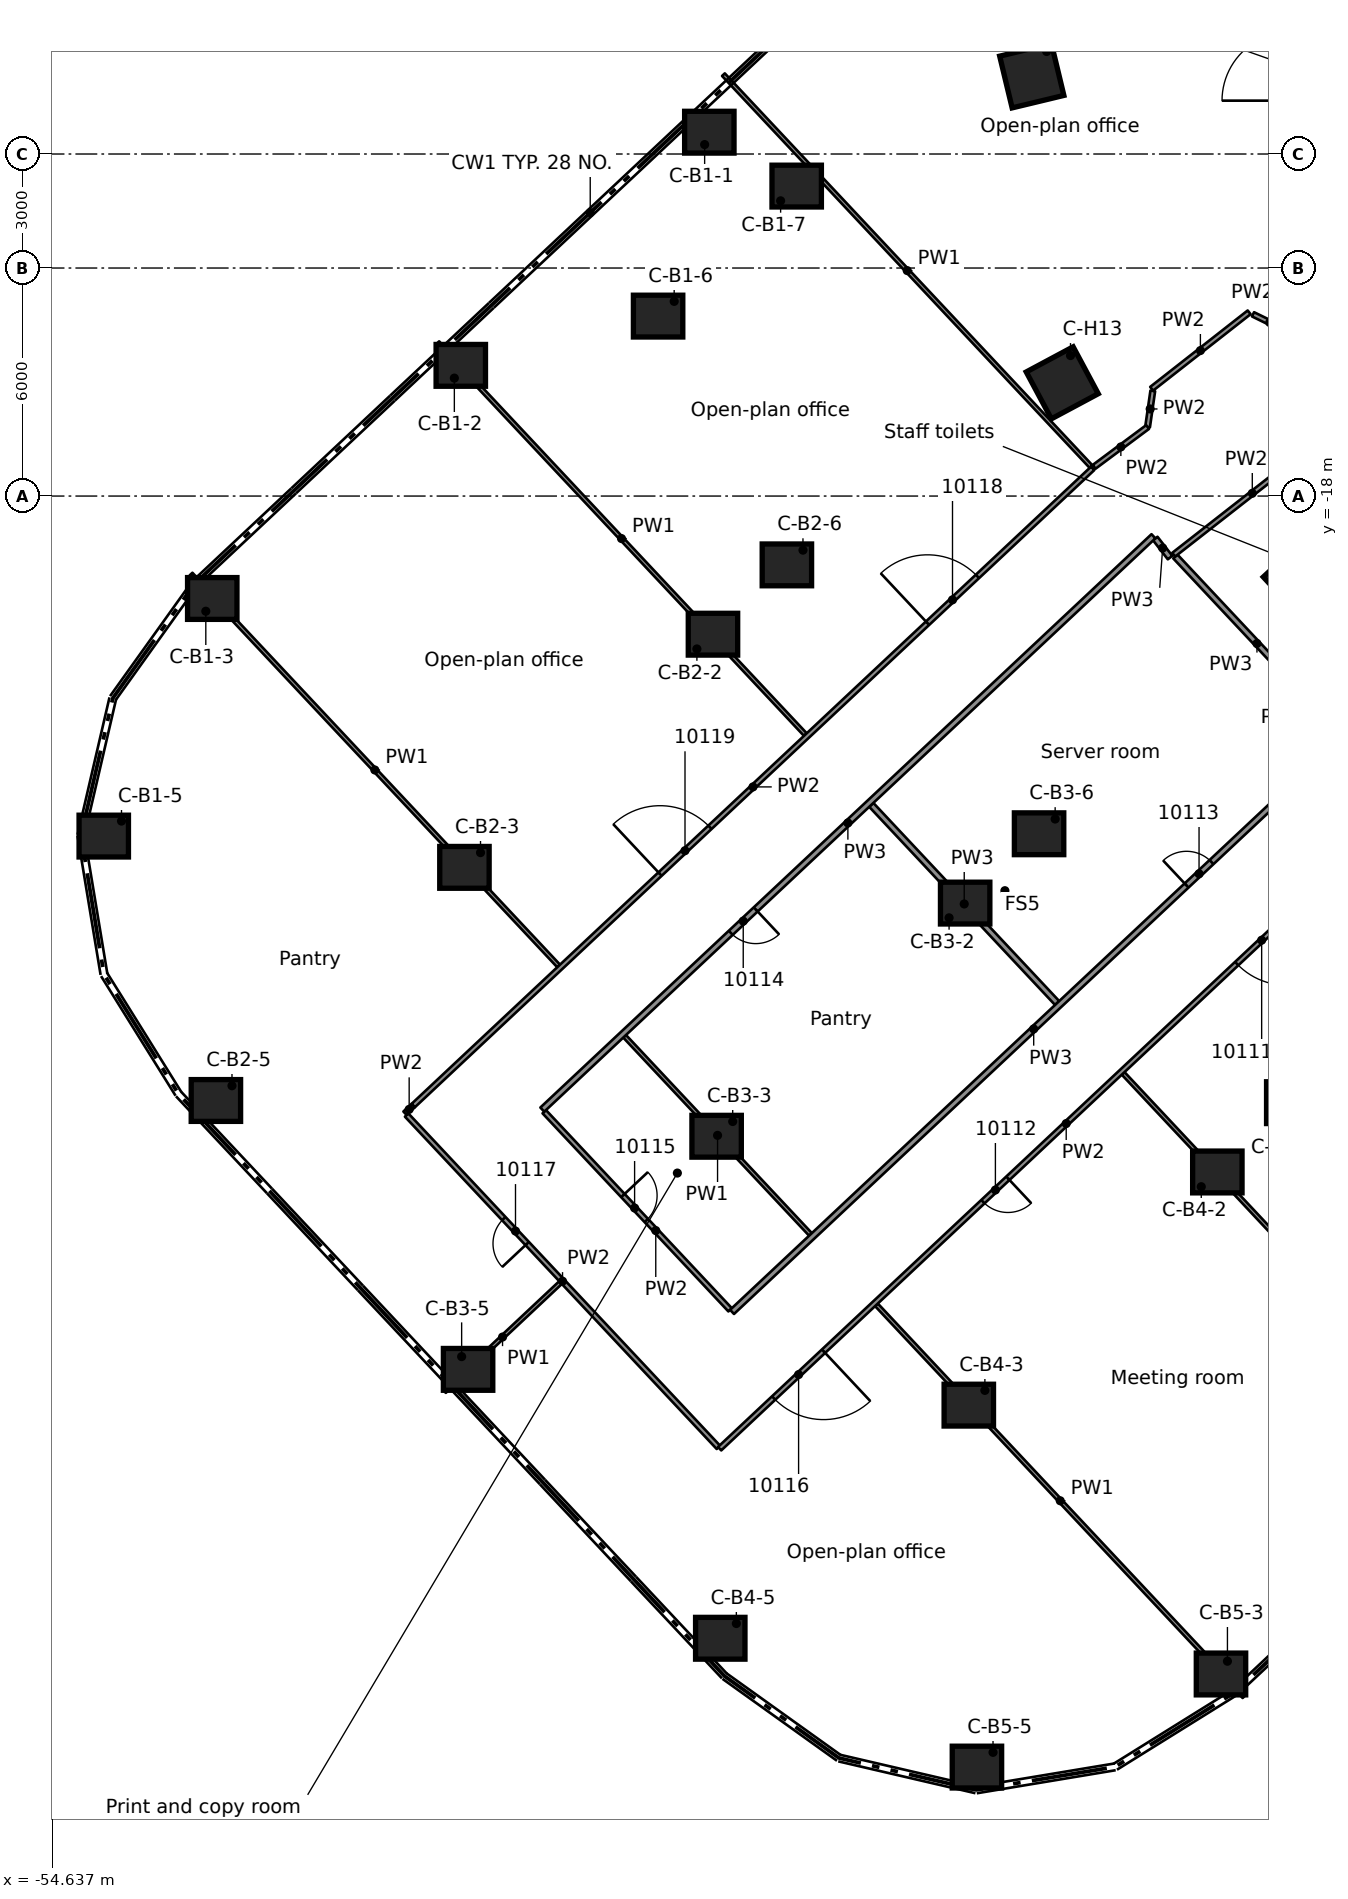
"""IFC4 building model, lengths in metres.
Left out: names, types, materials, properties, quantities, classifications, styles, units other than length and angle.
Written with IfcOpenShell. Run it as: python <this file> out.ifc"""

import sys

from ifc_helpers import new_model, si_unit, direction, frame, frame_2d, origin, origin_2d, place, context, subcontext, project, spatial, rectangle, extrude, element, fill, save


model = new_model("IFC4")
c1 = context("Model", 3, precision=1e-05, world=origin(), true_north=direction((0.0, 1.0)))
c2 = subcontext(c1, "Body", "Model", "MODEL_VIEW")
j1 = project(units=[si_unit("LENGTHUNIT", "METRE"), si_unit("PLANEANGLEUNIT", "RADIAN")], contexts=[c1])
p1 = place(None, origin())
s1 = spatial("IfcSite", under=j1, at=p1, CompositionType="ELEMENT")
p2 = place(p1, origin())
s2 = spatial("IfcBuilding", under=s1, at=p2, CompositionType="ELEMENT")
p3 = place(p2, frame((0.0, 0.0, 51.3)))
s3 = spatial("IfcBuildingStorey", under=s2, at=p3, CompositionType="ELEMENT", Elevation=51.3)
for number, where, z_axis, x_axis in (
    (1, (-37.341, -8.426, 0.0), (0.0, 0.0, 1.0), (1.0, 0.0, 0.0)),
    (2, (-43.881, -14.561, 0.0), (0.0, 0.0, 1.0), (1.0, 0.0, 0.0)),
    (3, (-50.421, -20.695, 0.0), (0.0, 0.0, 1.0), (1.0, 0.0, 0.0)),
    (4, (-53.276, -26.947, 0.0), (0.0, 0.0, 1.0), (1.0, 0.0, 0.0)),
    (5, (-38.689, -13.265, 0.0), (0.0, 0.0, 1.0), (1.0, 0.0, 0.0)),
    (6, (-35.042, -9.844, 0.0), (0.0, 0.0, 1.0), (1.0, 0.0, 0.0)),
    (7, (-37.245, -21.635, 0.0), (0.0, 0.0, 1.0), (1.0, 0.0, 0.0)),
    (8, (-43.785, -27.77, 0.0), (0.0, 0.0, 1.0), (1.0, 0.0, 0.0)),
    (9, (-50.325, -33.904, 0.0), (0.0, 0.0, 1.0), (1.0, 0.0, 0.0)),
    (10, (-35.3, -19.811, 0.0), (0.0, 0.0, 1.0), (1.0, 0.0, 0.0)),
    (11, (-30.609, -28.71, 0.0), (0.0, 0.0, 1.0), (1.0, 0.0, 0.0)),
    (12, (-37.149, -34.845, 0.0), (0.0, 0.0, 1.0), (1.0, 0.0, 0.0)),
    (13, (-43.689, -40.979, 0.0), (0.0, 0.0, 1.0), (1.0, 0.0, 0.0)),
    (14, (-28.664, -26.886, 0.0), (0.0, 0.0, 1.0), (1.0, 0.0, 0.0)),
    (15, (-23.973, -35.785, 0.0), (0.0, 0.0, 1.0), (1.0, 0.0, 0.0)),
    (16, (-30.513, -41.92, 0.0), (0.0, 0.0, 1.0), (1.0, 0.0, 0.0)),
    (17, (-37.053, -48.054, 0.0), (0.0, 0.0, 1.0), (1.0, 0.0, 0.0)),
    (18, (-22.028, -33.961, 0.0), (0.0, 0.0, 1.0), (1.0, 0.0, 0.0)),
    (19, (-23.877, -48.994, 0.0), (0.0, 0.0, 1.0), (1.0, 0.0, 0.0)),
    (20, (-30.299, -51.444, 0.0), (0.0, 0.0, 1.0), (1.0, 0.0, 0.0)),
):
    element("IfcColumn", number, at=place(p3, frame(where, z_axis=z_axis, x_axis=x_axis)), inside=s3, PredefinedType="COLUMN", context=c2, shape_type="SweptSolid", body=[
        extrude(rectangle(XDim=1.3, YDim=1.1, at=origin_2d()), origin(), (0.0, 0.0, 1.0), 3.5),
    ])
for number, where, z_axis, x_axis in (
    (21, (-21.774, -20.167, 0.0), (0.0, 0.0, 1.0), (-0.734, -0.68, 0.0)),
    (22, (-28.054, -15.021, 0.0), (0.0, 0.0, 1.0), (-0.882, -0.472, 0.0)),
    (23, (-28.856, -6.942, 0.0), (0.0, 0.0, 1.0), (-0.972, -0.234, 0.0)),
):
    element("IfcColumn", number, at=place(p3, frame(where, z_axis=z_axis, x_axis=x_axis)), inside=s3, PredefinedType="COLUMN", context=c2, shape_type="SweptSolid", body=[
        extrude(rectangle(XDim=1.4, YDim=1.4, at=origin_2d()), origin(), (0.0, 0.0, 1.0), 3.5),
    ])
p4 = place(p3, frame((-25.672, -15.233, 0.0), z_axis=(0.0, 0.0, 1.0), x_axis=(-0.142523859518, -0.989791366636, 0.0)))
e24 = element("IfcWall", 24, at=p4, inside=s3, PredefinedType="PARTITIONING", context=c2, shape_type="SweptSolid", body=[
    extrude(rectangle(XDim=0.961, YDim=0.125, at=frame_2d((0.48, 0.0))), origin(), (0.0, 0.0, 1.0), 3.08),
])
p5 = place(p3, frame((-25.607, -19.117, 0.0), z_axis=(0.0, 0.0, 1.0), x_axis=(0.613435225839, -0.789745037148, 0.0)))
e25 = element("IfcWall", 25, at=p5, inside=s3, PredefinedType="PARTITIONING", context=c2, shape_type="SweptSolid", body=[
    extrude(rectangle(XDim=0.635, YDim=0.15, at=frame_2d((0.318, 0.0))), origin(), (0.0, 0.0, 1.0), 3.08),
])
p6 = place(p3, frame((-37.101, -43.032, 0.0), z_axis=(0.0, 0.0, 1.0), x_axis=(-0.684230259848, 0.729266036168, 0.0)))
e26 = element("IfcWall", 26, at=p6, inside=s3, PredefinedType="PARTITIONING", context=c2, shape_type="SweptSolid", body=[
    extrude(rectangle(XDim=11.991, YDim=0.125, at=frame_2d((5.996, 0.0))), origin(), (0.0, 0.0, 1.0), 3.08),
])
p7 = place(p6, frame((7.355, 0.0, 0.0)))
e27 = element("IfcOpeningElement", 27, at=p7, cuts=e26, PredefinedType="OPENING", context=c2, shape_type="SweptSolid", body=[
    extrude(rectangle(XDim=0.9, YDim=2.1, at=frame_2d((0.45, 1.05))), frame((0.0, 0.073, 0.0), z_axis=(0.0, -1.0, 0.0), x_axis=(1.0, 0.0, 0.0)), (0.0, 0.0, 1.0), 0.145),
])
p8 = place(p3, frame((-41.685, -34.199, 0.0), z_axis=(0.0, 0.0, 1.0), x_axis=(0.68422395917, -0.729271947697, 0.0)))
e28 = element("IfcWall", 28, at=p8, inside=s3, PredefinedType="PARTITIONING", context=c2, shape_type="SweptSolid", body=[
    extrude(rectangle(XDim=7.148, YDim=0.125, at=frame_2d((3.574, 0.0))), origin(), (0.0, 0.0, 1.0), 3.08),
])
p9 = place(p8, frame((3.025, 0.0, 0.0)))
e29 = element("IfcOpeningElement", 29, at=p9, cuts=e28, PredefinedType="OPENING", context=c2, shape_type="SweptSolid", body=[
    extrude(rectangle(XDim=0.9, YDim=2.1, at=frame_2d((0.45, 1.05))), frame((0.0, 0.073, 0.0), z_axis=(0.0, -1.0, 0.0), x_axis=(1.0, 0.0, 0.0)), (0.0, 0.0, 1.0), 0.145),
])
p10 = place(p3, frame((-50.979, -20.052, 0.0), z_axis=(0.0, 0.0, 1.0), x_axis=(0.684149048077, -0.729342224209, 0.0)))
e30 = element("IfcWall", 30, at=p10, inside=s3, PredefinedType="PARTITIONING", context=c2, shape_type="SweptSolid", body=[
    extrude(rectangle(XDim=14.137, YDim=0.1, at=frame_2d((7.069, 0.0))), origin(), (0.0, 0.0, 1.0), 3.08),
])
p11 = place(p3, frame((-39.57, -32.215, 0.0), z_axis=(0.0, 0.0, 1.0), x_axis=(0.684241001323, -0.729255957884, 0.0)))
e31 = element("IfcWall", 31, at=p11, inside=s3, PredefinedType="PARTITIONING", context=c2, shape_type="SweptSolid", body=[
    extrude(rectangle(XDim=7.148, YDim=0.1, at=frame_2d((3.574, 0.0))), origin(), (0.0, 0.0, 1.0), 3.08),
])
p12 = place(p3, frame((-32.943, -39.281, 0.0), z_axis=(0.0, 0.0, 1.0), x_axis=(0.684149048077, -0.729342224209, 0.0)))
e32 = element("IfcWall", 32, at=p12, inside=s3, PredefinedType="PARTITIONING", context=c2, shape_type="SweptSolid", body=[
    extrude(rectangle(XDim=14.137, YDim=0.1, at=frame_2d((7.069, 0.0))), origin(), (0.0, 0.0, 1.0), 3.08),
])
p13 = place(p3, frame((-44.487, -13.963, 0.0), z_axis=(0.0, 0.0, 1.0), x_axis=(0.684112301014, -0.729376692526, 0.0)))
e33 = element("IfcWall", 33, at=p13, inside=s3, PredefinedType="PARTITIONING", context=c2, shape_type="SweptSolid", body=[
    extrude(rectangle(XDim=14.137, YDim=0.1, at=frame_2d((7.068, 0.0))), origin(), (0.0, 0.0, 1.0), 3.08),
])
p14 = place(p3, frame((-33.079, -26.126, 0.0), z_axis=(0.0, 0.0, 1.0), x_axis=(0.684155795313, -0.729335895003, 0.0)))
e34 = element("IfcWall", 34, at=p14, inside=s3, PredefinedType="PARTITIONING", context=c2, shape_type="SweptSolid", body=[
    extrude(rectangle(XDim=7.149, YDim=0.15, at=frame_2d((3.575, 0.0))), origin(), (0.0, 0.0, 1.0), 3.08),
])
p15 = place(p3, frame((-26.451, -33.192, 0.0), z_axis=(0.0, 0.0, 1.0), x_axis=(0.684103113435, -0.729385309825, 0.0)))
e35 = element("IfcWall", 35, at=p15, inside=s3, PredefinedType="PARTITIONING", context=c2, shape_type="SweptSolid", body=[
    extrude(rectangle(XDim=14.137, YDim=0.1, at=frame_2d((7.068, 0.0))), origin(), (0.0, 0.0, 1.0), 2.445),
])
p16 = place(p3, frame((-36.97, -6.912, 0.0), z_axis=(0.0, 0.0, 1.0), x_axis=(0.684148478852, -0.729342758163, 0.0)))
e36 = element("IfcWall", 36, at=p16, inside=s3, PredefinedType="PARTITIONING", context=c2, shape_type="SweptSolid", body=[
    extrude(rectangle(XDim=14.137, YDim=0.1, at=frame_2d((7.069, 0.0))), origin(), (0.0, 0.0, 1.0), 3.08),
])
p17 = place(p3, frame((-25.078, -19.59, 0.0), z_axis=(0.0, 0.0, 1.0), x_axis=(0.684131264462, -0.729358905468, 0.0)))
e37 = element("IfcWall", 37, at=p17, inside=s3, PredefinedType="PARTITIONING", context=c2, shape_type="SweptSolid", body=[
    extrude(rectangle(XDim=6.278, YDim=0.15, at=frame_2d((3.139, 0.0))), origin(), (0.0, 0.0, 1.0), 3.08),
])
p18 = place(p3, frame((-23.034, -13.218, 0.0), z_axis=(0.0, 0.0, 1.0), x_axis=(0.898277364267, -0.439428921267, 0.0)))
e38 = element("IfcWall", 38, at=p18, inside=s3, PredefinedType="PARTITIONING", context=c2, shape_type="SweptSolid", body=[
    extrude(rectangle(XDim=0.981, YDim=0.125, at=frame_2d((0.49, 0.0))), origin(), (0.0, 0.0, 1.0), 3.08),
])
p19 = place(p3, frame((-25.809, -16.184, 0.0), z_axis=(0.0, 0.0, 1.0), x_axis=(-0.802084274436, -0.597210864522, 0.0)))
e39 = element("IfcWall", 39, at=p19, inside=s3, PredefinedType="PARTITIONING", context=c2, shape_type="SweptSolid", body=[
    extrude(rectangle(XDim=1.753, YDim=0.125, at=frame_2d((0.876, 0.0))), origin(), (0.0, 0.0, 1.0), 3.08),
])
p20 = place(p3, frame((-20.986, -16.311, 0.0), z_axis=(0.0, 0.0, 1.0), x_axis=(-0.787889650509, -0.615816448807, 0.0)))
e40 = element("IfcWall", 40, at=p20, inside=s3, PredefinedType="PARTITIONING", context=c2, shape_type="SweptSolid", body=[
    extrude(rectangle(XDim=5.248, YDim=0.125, at=frame_2d((2.624, 0.0))), origin(), (0.0, 0.0, 1.0), 3.08),
])
p21 = place(p3, frame((-23.136, -13.166, 0.0), z_axis=(0.0, 0.0, 1.0), x_axis=(-0.787076551365, -0.616855333358, 0.0)))
e41 = element("IfcWall", 41, at=p21, inside=s3, PredefinedType="PARTITIONING", context=c2, shape_type="SweptSolid", body=[
    extrude(rectangle(XDim=3.26, YDim=0.125, at=frame_2d((1.63, 0.0))), origin(), (0.0, 0.0, 1.0), 3.08),
])
p22 = place(p3, frame((-45.349, -34.24, 0.0), z_axis=(0.0, 0.0, 1.0), x_axis=(0.730297588588, 0.683129147455, 0.0)))
e42 = element("IfcWall", 42, at=p22, inside=s3, PredefinedType="PARTITIONING", context=c2, shape_type="SweptSolid", body=[
    extrude(rectangle(XDim=0.3, YDim=0.125, at=frame_2d((0.15, 0.0))), origin(), (0.0, 0.0, 1.0), 3.08),
])
p23 = place(p3, frame((-18.83, -25.956, 0.0), z_axis=(0.0, 0.0, 1.0), x_axis=(-0.729340205708, -0.684151199909, 0.0)))
e43 = element("IfcWall", 43, at=p23, inside=s3, PredefinedType="PARTITIONING", context=c2, shape_type="SweptSolid", body=[
    extrude(rectangle(XDim=25.009, YDim=0.125, at=frame_2d((12.504, 0.0))), origin(), (0.0, 0.0, 1.0), 3.08),
])
p24 = place(p23, frame((4.553, 0.0, 0.0)))
e44 = element("IfcOpeningElement", 44, at=p24, cuts=e43, PredefinedType="OPENING", context=c2, shape_type="SweptSolid", body=[
    extrude(rectangle(XDim=1.8, YDim=2.1, at=frame_2d((0.9, 1.05))), frame((0.0, 0.073, 0.0), z_axis=(0.0, -1.0, 0.0), x_axis=(1.0, 0.0, 0.0)), (0.0, 0.0, 1.0), 0.145),
])
p25 = place(p23, frame((14.609, 0.0, 0.0)))
e45 = element("IfcOpeningElement", 45, at=p25, cuts=e43, PredefinedType="OPENING", context=c2, shape_type="SweptSolid", body=[
    extrude(rectangle(XDim=0.9, YDim=2.1, at=frame_2d((0.45, 1.05))), frame((0.0, 0.073, 0.0), z_axis=(0.0, -1.0, 0.0), x_axis=(1.0, 0.0, 0.0)), (0.0, 0.0, 1.0), 0.145),
])
p26 = place(p23, frame((21.26, 0.0, 0.0)))
e46 = element("IfcOpeningElement", 46, at=p26, cuts=e43, PredefinedType="OPENING", context=c2, shape_type="SweptSolid", body=[
    extrude(rectangle(XDim=1.8, YDim=2.1, at=frame_2d((0.9, 1.05))), frame((0.0, 0.073, 0.0), z_axis=(0.0, -1.0, 0.0), x_axis=(1.0, 0.0, 0.0)), (0.0, 0.0, 1.0), 0.145),
])
p27 = place(p3, frame((-36.743, -39.467, 0.0), z_axis=(0.0, 0.0, 1.0), x_axis=(0.729324503449, 0.684167938936, 0.0)))
e47 = element("IfcWall", 47, at=p27, inside=s3, PredefinedType="PARTITIONING", context=c2, shape_type="SweptSolid", body=[
    extrude(rectangle(XDim=21.767, YDim=0.15, at=frame_2d((10.883, 0.0))), origin(), (0.0, 0.0, 1.0), 3.08),
])
p28 = place(p27, frame((16.399, 0.0, 0.0)))
e48 = element("IfcOpeningElement", 48, at=p28, cuts=e47, PredefinedType="OPENING", context=c2, shape_type="SweptSolid", body=[
    extrude(rectangle(XDim=0.9, YDim=2.1, at=frame_2d((0.45, 1.05))), frame((0.0, 0.085, 0.0), z_axis=(0.0, -1.0, 0.0), x_axis=(1.0, 0.0, 0.0)), (0.0, 0.0, 1.0), 0.17),
])
p29 = place(p3, frame((-44.309, -41.561, 0.0), z_axis=(0.0, 0.0, 1.0), x_axis=(0.729200696285, 0.684299893715, 0.0)))
e49 = element("IfcWall", 49, at=p29, inside=s3, PredefinedType="PARTITIONING", context=c2, shape_type="SweptSolid", body=[
    extrude(rectangle(XDim=4.187, YDim=0.1, at=frame_2d((2.093, 0.0))), origin(), (0.0, 0.0, 1.0), 3.08),
])
p30 = place(p3, frame((-25.654, -19.058, 0.0), z_axis=(0.0, 0.0, 1.0), x_axis=(-0.729332765971, -0.684159130964, 0.0)))
e50 = element("IfcWall", 50, at=p30, inside=s3, PredefinedType="PARTITIONING", context=c2, shape_type="SweptSolid", body=[
    extrude(rectangle(XDim=22.05, YDim=0.15, at=frame_2d((11.025, 0.0))), origin(), (0.0, 0.0, 1.0), 3.08),
])
p31 = place(p30, frame((14.351, 0.0, 0.0)))
e51 = element("IfcOpeningElement", 51, at=p31, cuts=e50, PredefinedType="OPENING", context=c2, shape_type="SweptSolid", body=[
    extrude(rectangle(XDim=0.9, YDim=2.1, at=frame_2d((0.45, 1.05))), frame((0.0, 0.085, 0.0), z_axis=(0.0, -1.0, 0.0), x_axis=(1.0, 0.0, 0.0)), (0.0, 0.0, 1.0), 0.17),
])
p32 = place(p3, frame((-45.13, -34.035, 0.0), z_axis=(0.0, 0.0, 1.0), x_axis=(0.729450212829, 0.684033907788, 0.0)))
e52 = element("IfcWall", 52, at=p32, inside=s3, PredefinedType="PARTITIONING", context=c2, shape_type="SweptSolid", body=[
    extrude(rectangle(XDim=24.507, YDim=0.125, at=frame_2d((12.254, 0.0))), origin(), (0.0, 0.0, 1.0), 3.08),
])
p33 = place(p32, frame((18.55, 0.0, 0.0)))
e53 = element("IfcOpeningElement", 53, at=p33, cuts=e52, PredefinedType="OPENING", context=c2, shape_type="SweptSolid", body=[
    extrude(rectangle(XDim=1.8, YDim=2.1, at=frame_2d((0.9, 1.05))), frame((0.0, 0.073, 0.0), z_axis=(0.0, -1.0, 0.0), x_axis=(1.0, 0.0, 0.0)), (0.0, 0.0, 1.0), 0.145),
])
p34 = place(p32, frame((8.9, 0.0, 0.0)))
e54 = element("IfcOpeningElement", 54, at=p34, cuts=e52, PredefinedType="OPENING", context=c2, shape_type="SweptSolid", body=[
    extrude(rectangle(XDim=1.8, YDim=2.1, at=frame_2d((0.9, 1.05))), frame((0.0, 0.073, 0.0), z_axis=(0.0, -1.0, 0.0), x_axis=(1.0, 0.0, 0.0)), (0.0, 0.0, 1.0), 0.145),
])
p35 = place(p24, origin())
e55 = element("IfcDoor", 55, at=p35, inside=s3, OperationType="DOUBLE_DOOR_SINGLE_SWING", PredefinedType="DOOR", context=c2, shape_type="SweptSolid", body=[
    extrude(rectangle(XDim=1.8, YDim=2.1, at=frame_2d((0.9, 1.05))), frame((0.0, 0.025, 0.0), z_axis=(0.0, -1.0, 0.0), x_axis=(1.0, 0.0, 0.0)), (0.0, 0.0, 1.0), 0.05),
])
fill(e44, e55)
p36 = place(p25, origin())
e56 = element("IfcDoor", 56, at=p36, inside=s3, OperationType="SINGLE_SWING_RIGHT", PredefinedType="DOOR", context=c2, shape_type="SweptSolid", body=[
    extrude(rectangle(XDim=0.9, YDim=2.1, at=frame_2d((0.45, 1.05))), frame((0.0, 0.025, 0.0), z_axis=(0.0, -1.0, 0.0), x_axis=(1.0, 0.0, 0.0)), (0.0, 0.0, 1.0), 0.05),
])
fill(e45, e56)
p37 = place(p28, origin())
e57 = element("IfcDoor", 57, at=p37, inside=s3, OperationType="SINGLE_SWING_RIGHT", PredefinedType="DOOR", context=c2, shape_type="SweptSolid", body=[
    extrude(rectangle(XDim=0.9, YDim=2.1, at=frame_2d((0.45, 1.05))), frame((0.0, 0.025, 0.0), z_axis=(0.0, -1.0, 0.0), x_axis=(1.0, 0.0, 0.0)), (0.0, 0.0, 1.0), 0.05),
])
fill(e48, e57)
p38 = place(p31, origin())
e58 = element("IfcDoor", 58, at=p38, inside=s3, OperationType="SINGLE_SWING_RIGHT", PredefinedType="DOOR", context=c2, shape_type="SweptSolid", body=[
    extrude(rectangle(XDim=0.9, YDim=2.1, at=frame_2d((0.45, 1.05))), frame((0.0, 0.025, 0.0), z_axis=(0.0, -1.0, 0.0), x_axis=(1.0, 0.0, 0.0)), (0.0, 0.0, 1.0), 0.05),
])
fill(e51, e58)
p39 = place(p9, origin())
e59 = element("IfcDoor", 59, at=p39, inside=s3, OperationType="SINGLE_SWING_LEFT", PredefinedType="DOOR", context=c2, shape_type="SweptSolid", body=[
    extrude(rectangle(XDim=0.9, YDim=2.1, at=frame_2d((0.45, 1.05))), frame((0.0, 0.025, 0.0), z_axis=(0.0, -1.0, 0.0), x_axis=(1.0, 0.0, 0.0)), (0.0, 0.0, 1.0), 0.05),
])
fill(e29, e59)
p40 = place(p26, origin())
e60 = element("IfcDoor", 60, at=p40, inside=s3, OperationType="DOUBLE_DOOR_SINGLE_SWING", PredefinedType="DOOR", context=c2, shape_type="SweptSolid", body=[
    extrude(rectangle(XDim=1.8, YDim=2.1, at=frame_2d((0.9, 1.05))), frame((0.0, 0.025, 0.0), z_axis=(0.0, -1.0, 0.0), x_axis=(1.0, 0.0, 0.0)), (0.0, 0.0, 1.0), 0.05),
])
fill(e46, e60)
p41 = place(p7, origin())
e61 = element("IfcDoor", 61, at=p41, inside=s3, OperationType="SINGLE_SWING_RIGHT", PredefinedType="DOOR", context=c2, shape_type="SweptSolid", body=[
    extrude(rectangle(XDim=0.9, YDim=2.1, at=frame_2d((0.45, 1.05))), frame((0.0, 0.025, 0.0), z_axis=(0.0, -1.0, 0.0), x_axis=(1.0, 0.0, 0.0)), (0.0, 0.0, 1.0), 0.05),
])
fill(e27, e61)
p42 = place(p33, origin())
e62 = element("IfcDoor", 62, at=p42, inside=s3, OperationType="DOUBLE_DOOR_SINGLE_SWING", PredefinedType="DOOR", context=c2, shape_type="SweptSolid", body=[
    extrude(rectangle(XDim=1.8, YDim=2.1, at=frame_2d((0.9, 1.05))), frame((0.0, 0.025, 0.0), z_axis=(0.0, -1.0, 0.0), x_axis=(1.0, 0.0, 0.0)), (0.0, 0.0, 1.0), 0.05),
])
fill(e53, e62)
p43 = place(p34, origin())
e63 = element("IfcDoor", 63, at=p43, inside=s3, OperationType="DOUBLE_DOOR_SINGLE_SWING", PredefinedType="DOOR", context=c2, shape_type="SweptSolid", body=[
    extrude(rectangle(XDim=1.8, YDim=2.1, at=frame_2d((0.9, 1.05))), frame((0.0, 0.025, 0.0), z_axis=(0.0, -1.0, 0.0), x_axis=(1.0, 0.0, 0.0)), (0.0, 0.0, 1.0), 0.05),
])
fill(e54, e63)
save(model, sys.argv[1])
